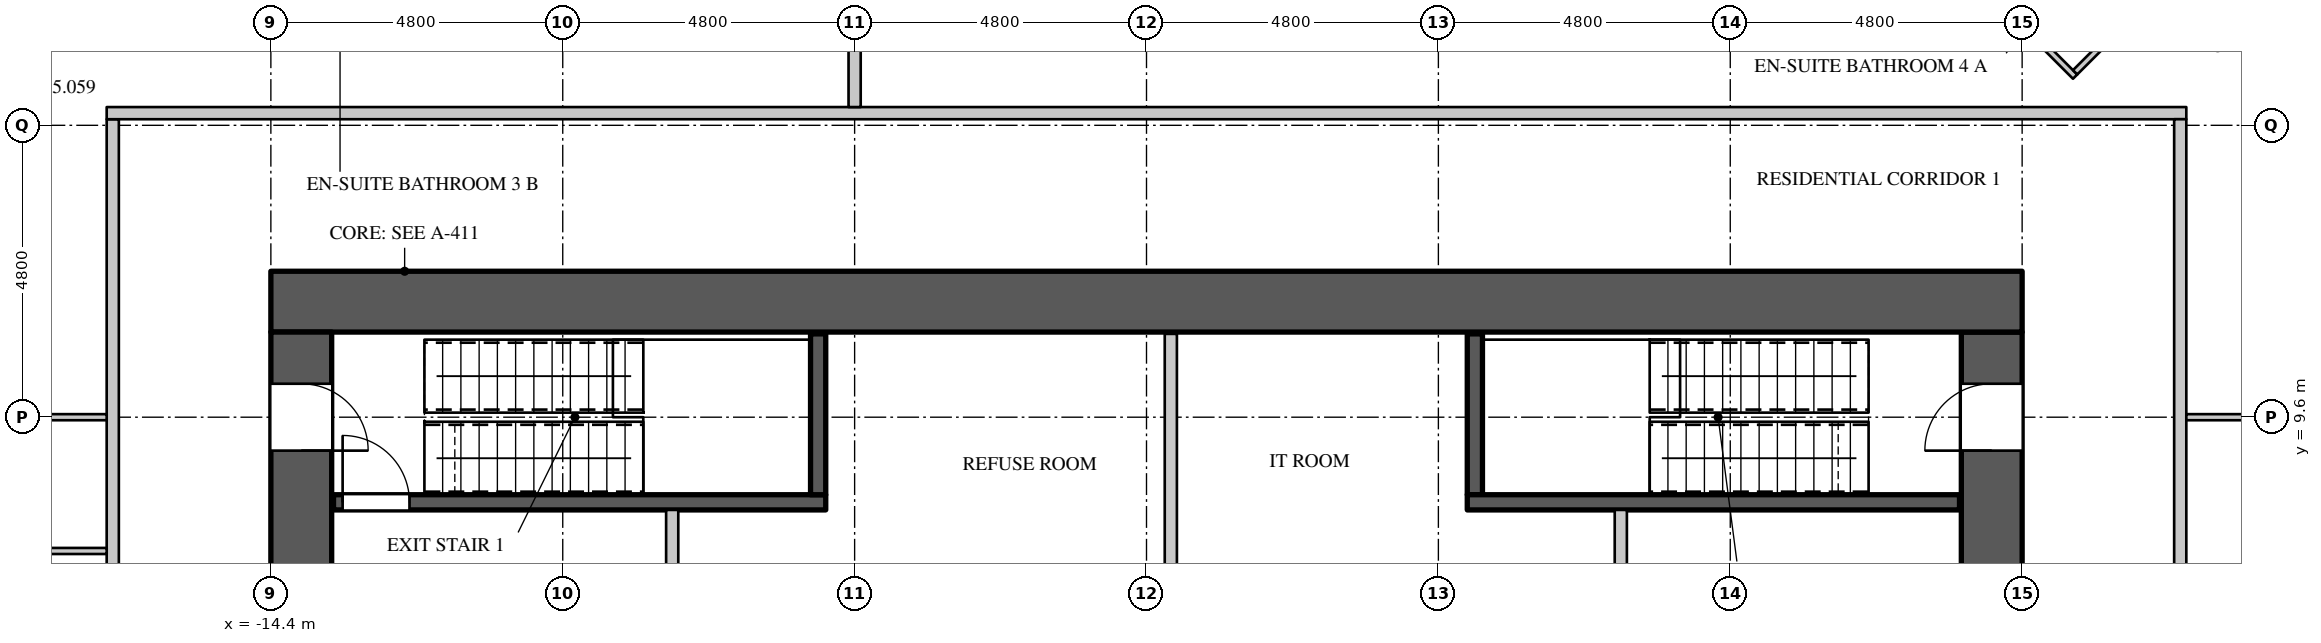
"""IFC4 building model, lengths in metres.
Left out: names, types, materials, properties, quantities, classifications, styles, units other than length and angle.
Written with IfcOpenShell. Run it as: python <this file> out.ifc"""

import sys

from ifc_helpers import new_model, si_unit, direction, frame, frame_2d, origin, place, context, subcontext, project, spatial, rectangle, extrude, element, fill, save


model = new_model("IFC4")
c1 = context("Model", 3, precision=1e-05, world=origin(), true_north=direction((0.0, 1.0)))
c2 = subcontext(c1, "Body", "Model", "MODEL_VIEW")
j1 = project(units=[si_unit("LENGTHUNIT", "METRE"), si_unit("PLANEANGLEUNIT", "RADIAN")], contexts=[c1])
p1 = place(None, origin())
s1 = spatial("IfcSite", under=j1, at=p1, CompositionType="ELEMENT")
p2 = place(p1, origin())
s2 = spatial("IfcBuilding", under=s1, at=p2, CompositionType="ELEMENT")
p3 = place(p2, frame((0.0, 0.0, 59.1)))
s3 = spatial("IfcBuildingStorey", under=s2, at=p3, CompositionType="ELEMENT", Elevation=59.1)
p4 = place(p3, frame((-14.4, 11.5, 0.0), z_axis=(0.0, 0.0, 1.0), x_axis=(1.0, 0.0, 0.0)))
e1 = element("IfcWall", 1, at=p4, inside=s3, PredefinedType="SHEAR", context=c2, shape_type="SweptSolid", body=[
    extrude(rectangle(XDim=28.8, YDim=1.0, at=frame_2d((14.4, 0.0))), origin(), (0.0, 0.0, 1.0), 4.2),
])
p5 = place(p3, frame((13.9, -11.0, 0.0), z_axis=(0.0, 0.0, 1.0), x_axis=(0.0, 1.0, 0.0)))
e2 = element("IfcWall", 2, at=p5, inside=s3, PredefinedType="SHEAR", context=c2, shape_type="SweptSolid", body=[
    extrude(rectangle(XDim=22.0, YDim=1.0, at=frame_2d((11.0, 0.0))), origin(), (0.0, 0.0, 1.0), 4.2),
])
p6 = place(p5, frame((20.05, 0.0, 0.0)))
e3 = element("IfcOpeningElement", 3, at=p6, cuts=e2, PredefinedType="OPENING", context=c2, shape_type="SweptSolid", body=[
    extrude(rectangle(XDim=1.1, YDim=2.2, at=frame_2d((0.55, 1.1))), frame((0.0, 0.51, 0.0), z_axis=(0.0, -1.0, 0.0), x_axis=(1.0, 0.0, 0.0)), (0.0, 0.0, 1.0), 1.02),
])
p7 = place(p5, frame((0.85, 0.0, 0.0)))
e4 = element("IfcOpeningElement", 4, at=p7, cuts=e2, PredefinedType="OPENING", context=c2, shape_type="SweptSolid", body=[
    extrude(rectangle(XDim=1.1, YDim=2.2, at=frame_2d((0.55, 1.1))), frame((0.0, 0.51, 0.0), z_axis=(0.0, -1.0, 0.0), x_axis=(1.0, 0.0, 0.0)), (0.0, 0.0, 1.0), 1.02),
])
p8 = place(p5, frame((14.55, 0.0, 0.0)))
e5 = element("IfcOpeningElement", 5, at=p8, cuts=e2, PredefinedType="OPENING", context=c2, shape_type="SweptSolid", body=[
    extrude(rectangle(XDim=1.5, YDim=2.4, at=frame_2d((0.75, 1.2))), frame((0.0, 0.51, 0.0), z_axis=(0.0, -1.0, 0.0), x_axis=(1.0, 0.0, 0.0)), (0.0, 0.0, 1.0), 1.02),
])
p9 = place(p5, frame((5.95, 0.0, 0.0)))
e6 = element("IfcOpeningElement", 6, at=p9, cuts=e2, PredefinedType="OPENING", context=c2, shape_type="SweptSolid", body=[
    extrude(rectangle(XDim=1.5, YDim=2.4, at=frame_2d((0.75, 1.2))), frame((0.0, 0.51, 0.0), z_axis=(0.0, -1.0, 0.0), x_axis=(1.0, 0.0, 0.0)), (0.0, 0.0, 1.0), 1.02),
])
p10 = place(p3, frame((-13.9, -11.0, 0.0), z_axis=(0.0, 0.0, 1.0), x_axis=(0.0, 1.0, 0.0)))
e7 = element("IfcWall", 7, at=p10, inside=s3, PredefinedType="SHEAR", context=c2, shape_type="SweptSolid", body=[
    extrude(rectangle(XDim=22.0, YDim=1.0, at=frame_2d((11.0, 0.0))), origin(), (0.0, 0.0, 1.0), 4.2),
])
p11 = place(p10, frame((20.05, 0.0, 0.0)))
e8 = element("IfcOpeningElement", 8, at=p11, cuts=e7, PredefinedType="OPENING", context=c2, shape_type="SweptSolid", body=[
    extrude(rectangle(XDim=1.1, YDim=2.2, at=frame_2d((0.55, 1.1))), frame((0.0, 0.51, 0.0), z_axis=(0.0, -1.0, 0.0), x_axis=(1.0, 0.0, 0.0)), (0.0, 0.0, 1.0), 1.02),
])
p12 = place(p10, frame((0.85, 0.0, 0.0)))
e9 = element("IfcOpeningElement", 9, at=p12, cuts=e7, PredefinedType="OPENING", context=c2, shape_type="SweptSolid", body=[
    extrude(rectangle(XDim=1.1, YDim=2.2, at=frame_2d((0.55, 1.1))), frame((0.0, 0.51, 0.0), z_axis=(0.0, -1.0, 0.0), x_axis=(1.0, 0.0, 0.0)), (0.0, 0.0, 1.0), 1.02),
])
p13 = place(p10, frame((15.75, 0.0, 0.0)))
e10 = element("IfcOpeningElement", 10, at=p13, cuts=e7, PredefinedType="OPENING", context=c2, shape_type="SweptSolid", body=[
    extrude(rectangle(XDim=1.5, YDim=2.4, at=frame_2d((0.75, 1.2))), frame((0.0, 0.51, 0.0), z_axis=(0.0, -1.0, 0.0), x_axis=(1.0, 0.0, 0.0)), (0.0, 0.0, 1.0), 1.02),
])
p14 = place(p10, frame((4.75, 0.0, 0.0)))
e11 = element("IfcOpeningElement", 11, at=p14, cuts=e7, PredefinedType="OPENING", context=c2, shape_type="SweptSolid", body=[
    extrude(rectangle(XDim=1.5, YDim=2.4, at=frame_2d((0.75, 1.2))), frame((0.0, 0.51, 0.0), z_axis=(0.0, -1.0, 0.0), x_axis=(1.0, 0.0, 0.0)), (0.0, 0.0, 1.0), 1.02),
])
p15 = place(p3, frame((-17.0, -14.5, 0.0), z_axis=(0.0, 0.0, 1.0), x_axis=(0.0, 1.0, 0.0)))
e12 = element("IfcWall", 12, at=p15, inside=s3, PredefinedType="PARTITIONING", context=c2, shape_type="SweptSolid", body=[
    extrude(rectangle(XDim=29.0, YDim=0.2, at=frame_2d((14.5, 0.0))), origin(), (0.0, 0.0, 1.0), 3.95),
])
p16 = place(p15, frame((16.55, 0.0, 0.0)))
e13 = element("IfcOpeningElement", 13, at=p16, cuts=e12, PredefinedType="OPENING", context=c2, shape_type="SweptSolid", body=[
    extrude(rectangle(XDim=1.1, YDim=2.4, at=frame_2d((0.55, 1.2))), frame((0.0, 0.11, 0.0), z_axis=(0.0, -1.0, 0.0), x_axis=(1.0, 0.0, 0.0)), (0.0, 0.0, 1.0), 0.22),
])
p17 = place(p3, frame((-17.1, 14.6, 0.0), z_axis=(0.0, 0.0, 1.0), x_axis=(1.0, 0.0, 0.0)))
e14 = element("IfcWall", 14, at=p17, inside=s3, PredefinedType="PARTITIONING", context=c2, shape_type="SweptSolid", body=[
    extrude(rectangle(XDim=34.2, YDim=0.2, at=frame_2d((17.1, 0.0))), origin(), (0.0, 0.0, 1.0), 3.95),
])
p18 = place(p3, frame((-7.8, 2.8, 0.0), z_axis=(0.0, 0.0, 1.0), x_axis=(0.0, 1.0, 0.0)))
e15 = element("IfcWall", 15, at=p18, inside=s3, PredefinedType="PARTITIONING", context=c2, shape_type="SweptSolid", body=[
    extrude(rectangle(XDim=5.275, YDim=0.2, at=frame_2d((2.637, 0.0))), origin(), (0.0, 0.0, 1.0), 3.95),
])
p19 = place(p18, frame((0.75, 0.0, 0.0)))
e16 = element("IfcOpeningElement", 16, at=p19, cuts=e15, PredefinedType="OPENING", context=c2, shape_type="SweptSolid", body=[
    extrude(rectangle(XDim=1.5, YDim=2.4, at=frame_2d((0.75, 1.2))), frame((0.0, 0.11, 0.0), z_axis=(0.0, -1.0, 0.0), x_axis=(1.0, 0.0, 0.0)), (0.0, 0.0, 1.0), 0.22),
])
p20 = place(p3, frame((17.0, -14.5, 0.0), z_axis=(0.0, 0.0, 1.0), x_axis=(0.0, 1.0, 0.0)))
e17 = element("IfcWall", 17, at=p20, inside=s3, PredefinedType="PARTITIONING", context=c2, shape_type="SweptSolid", body=[
    extrude(rectangle(XDim=29.0, YDim=0.2, at=frame_2d((14.5, 0.0))), origin(), (0.0, 0.0, 1.0), 3.95),
])
p21 = place(p20, frame((15.9, 0.0, 0.0)))
e18 = element("IfcOpeningElement", 18, at=p21, cuts=e17, PredefinedType="OPENING", context=c2, shape_type="SweptSolid", body=[
    extrude(rectangle(XDim=1.1, YDim=2.4, at=frame_2d((0.55, 1.2))), frame((0.0, 0.11, 0.0), z_axis=(0.0, -1.0, 0.0), x_axis=(1.0, 0.0, 0.0)), (0.0, 0.0, 1.0), 0.22),
])
p22 = place(p3, frame((-22.547, 11.885, 0.0), z_axis=(0.0, 0.0, 1.0), x_axis=(0.707106781187, 0.707106781187, 0.0)))
e19 = element("IfcWall", 19, at=p22, inside=s3, PredefinedType="PARTITIONING", context=c2, shape_type="SweptSolid", body=[
    extrude(rectangle(XDim=9.83, YDim=0.15, at=frame_2d((4.915, 0.0))), origin(), (0.0, 0.0, 1.0), 3.95),
])
p23 = place(p22, frame((3.95, 0.0, 0.0)))
e20 = element("IfcOpeningElement", 20, at=p23, cuts=e19, PredefinedType="OPENING", context=c2, shape_type="SweptSolid", body=[
    extrude(rectangle(XDim=0.95, YDim=2.2, at=frame_2d((0.475, 1.1))), frame((0.0, 0.085, 0.0), z_axis=(0.0, -1.0, 0.0), x_axis=(1.0, 0.0, 0.0)), (0.0, 0.0, 1.0), 0.17),
])
p24 = place(p22, frame((8.25, 0.0, 0.0)))
e21 = element("IfcOpeningElement", 21, at=p24, cuts=e19, PredefinedType="OPENING", context=c2, shape_type="SweptSolid", body=[
    extrude(rectangle(XDim=0.95, YDim=2.2, at=frame_2d((0.475, 1.1))), frame((0.0, 0.085, 0.0), z_axis=(0.0, -1.0, 0.0), x_axis=(1.0, 0.0, 0.0)), (0.0, 0.0, 1.0), 0.17),
])
p25 = place(p3, frame((17.499, 17.499, 0.0), z_axis=(0.0, 0.0, 1.0), x_axis=(0.707106781187, -0.707106781187, 0.0)))
e22 = element("IfcWall", 22, at=p25, inside=s3, PredefinedType="PARTITIONING", context=c2, shape_type="SweptSolid", body=[
    extrude(rectangle(XDim=7.855, YDim=0.15, at=frame_2d((3.927, 0.0))), origin(), (0.0, 0.0, 1.0), 3.95),
])
p26 = place(p25, frame((6.7, 0.0, 0.0)))
e23 = element("IfcOpeningElement", 23, at=p26, cuts=e22, PredefinedType="OPENING", context=c2, shape_type="SweptSolid", body=[
    extrude(rectangle(XDim=0.95, YDim=2.2, at=frame_2d((0.475, 1.1))), frame((0.0, 0.085, 0.0), z_axis=(0.0, -1.0, 0.0), x_axis=(1.0, 0.0, 0.0)), (0.0, 0.0, 1.0), 0.17),
])
p27 = place(p25, frame((2.1, 0.0, 0.0)))
e24 = element("IfcOpeningElement", 24, at=p27, cuts=e22, PredefinedType="OPENING", context=c2, shape_type="SweptSolid", body=[
    extrude(rectangle(XDim=0.95, YDim=2.2, at=frame_2d((0.475, 1.1))), frame((0.0, 0.085, 0.0), z_axis=(0.0, -1.0, 0.0), x_axis=(1.0, 0.0, 0.0)), (0.0, 0.0, 1.0), 0.17),
])
p28 = place(p3, frame((-4.8, 14.7, 0.0), z_axis=(0.0, 0.0, 1.0), x_axis=(0.0, 1.0, 0.0)))
e25 = element("IfcWall", 25, at=p28, inside=s3, PredefinedType="PARTITIONING", context=c2, shape_type="SweptSolid", body=[
    extrude(rectangle(XDim=13.2, YDim=0.2, at=frame_2d((6.6, 0.0))), origin(), (0.0, 0.0, 1.0), 3.2),
])
p29 = place(p3, frame((0.4, 5.9, 0.0), z_axis=(0.0, 0.0, 1.0), x_axis=(0.0, 1.0, 0.0)))
e26 = element("IfcWall", 26, at=p29, inside=s3, PredefinedType="PARTITIONING", context=c2, shape_type="SweptSolid", body=[
    extrude(rectangle(XDim=5.07, YDim=0.2, at=frame_2d((2.535, 0.0))), origin(), (0.0, 0.0, 1.0), 3.95),
])
p30 = place(p3, frame((7.8, 5.9, 0.0), z_axis=(0.0, 0.0, 1.0), x_axis=(0.0, 1.0, 0.0)))
e27 = element("IfcWall", 27, at=p30, inside=s3, PredefinedType="PARTITIONING", context=c2, shape_type="SweptSolid", body=[
    extrude(rectangle(XDim=2.175, YDim=0.2, at=frame_2d((1.087, 0.0))), origin(), (0.0, 0.0, 1.0), 3.95),
])
p31 = place(p3, frame((-13.37, 8.2, 0.0), z_axis=(0.0, 0.0, 1.0), x_axis=(1.0, 0.0, 0.0)))
e28 = element("IfcWall", 28, at=p31, inside=s3, PredefinedType="SHEAR", context=c2, shape_type="SweptSolid", body=[
    extrude(rectangle(XDim=8.095, YDim=0.25, at=frame_2d((4.048, 0.0))), origin(), (0.0, 0.0, 1.0), 3.95),
])
p32 = place(p31, frame((0.15, 0.0, 0.0)))
e29 = element("IfcOpeningElement", 29, at=p32, cuts=e28, PredefinedType="OPENING", context=c2, shape_type="SweptSolid", body=[
    extrude(rectangle(XDim=1.1, YDim=2.2, at=frame_2d((0.55, 1.1))), frame((0.0, 0.135, 0.0), z_axis=(0.0, -1.0, 0.0), x_axis=(1.0, 0.0, 0.0)), (0.0, 0.0, 1.0), 0.27),
])
for number, where, z_axis, x_axis in (
    (30, (-5.4, 8.325, 0.0), (0.0, 0.0, 1.0), (0.0, 1.0, 0.0)),
    (31, (5.4, 8.325, 0.0), (0.0, 0.0, 1.0), (0.0, 1.0, 0.0)),
):
    element("IfcWall", number, at=place(p3, frame(where, z_axis=z_axis, x_axis=x_axis)), inside=s3, PredefinedType="SHEAR", context=c2, shape_type="SweptSolid", body=[
        extrude(rectangle(XDim=2.645, YDim=0.25, at=frame_2d((1.323, 0.0))), origin(), (0.0, 0.0, 1.0), 3.95),
    ])
p33 = place(p3, frame((5.275, 8.2, 0.0), z_axis=(0.0, 0.0, 1.0), x_axis=(1.0, 0.0, 0.0)))
e32 = element("IfcWall", 32, at=p33, inside=s3, PredefinedType="SHEAR", context=c2, shape_type="SweptSolid", body=[
    extrude(rectangle(XDim=8.095, YDim=0.25, at=frame_2d((4.048, 0.0))), origin(), (0.0, 0.0, 1.0), 3.95),
])
p34 = place(p3, frame((-21.78, 9.6, 0.0), z_axis=(0.0, 0.0, 1.0), x_axis=(1.0, 0.0, 0.0)))
e33 = element("IfcWall", 33, at=p34, inside=s3, PredefinedType="PARTITIONING", context=c2, shape_type="SweptSolid", body=[
    extrude(rectangle(XDim=4.68, YDim=0.1, at=frame_2d((2.34, 0.0))), origin(), (0.0, 0.0, 1.0), 3.95),
])
p35 = place(p34, frame((1.95, 0.0, 0.0)))
e34 = element("IfcOpeningElement", 34, at=p35, cuts=e33, PredefinedType="OPENING", context=c2, shape_type="SweptSolid", body=[
    extrude(rectangle(XDim=0.9, YDim=2.2, at=frame_2d((0.45, 1.1))), frame((0.0, 0.06, 0.0), z_axis=(0.0, -1.0, 0.0), x_axis=(1.0, 0.0, 0.0)), (0.0, 0.0, 1.0), 0.12),
])
p36 = place(p3, frame((-21.725, 7.4, 0.0), z_axis=(0.0, 0.0, 1.0), x_axis=(1.0, 0.0, 0.0)))
e35 = element("IfcWall", 35, at=p36, inside=s3, PredefinedType="PARTITIONING", context=c2, shape_type="SweptSolid", body=[
    extrude(rectangle(XDim=4.625, YDim=0.1, at=frame_2d((2.312, 0.0))), origin(), (0.0, 0.0, 1.0), 3.95),
])
p37 = place(p3, frame((13.221, 17.251, 0.0), z_axis=(0.0, 0.0, 1.0), x_axis=(0.707148872128, -0.707064687739, 0.0)))
e36 = element("IfcWall", 36, at=p37, inside=s3, PredefinedType="PARTITIONING", context=c2, shape_type="SweptSolid", body=[
    extrude(rectangle(XDim=2.9, YDim=0.1, at=frame_2d((1.45, 0.0))), origin(), (0.0, 0.0, 1.0), 3.95),
])
p38 = place(p3, frame((15.271, 15.271, 0.0), z_axis=(0.0, 0.0, 1.0), x_axis=(0.707106781187, 0.707106781187, 0.0)))
e37 = element("IfcWall", 37, at=p38, inside=s3, PredefinedType="PARTITIONING", context=c2, shape_type="SweptSolid", body=[
    extrude(rectangle(XDim=3.13, YDim=0.1, at=frame_2d((1.565, 0.0))), origin(), (0.0, 0.0, 1.0), 3.95),
])
p39 = place(p3, frame((17.1, 9.6, 0.0), z_axis=(0.0, 0.0, 1.0), x_axis=(1.0, 0.0, 0.0)))
e38 = element("IfcWall", 38, at=p39, inside=s3, PredefinedType="PARTITIONING", context=c2, shape_type="SweptSolid", body=[
    extrude(rectangle(XDim=4.7, YDim=0.1, at=frame_2d((2.35, 0.0))), origin(), (0.0, 0.0, 1.0), 3.95),
])
p40 = place(p39, frame((1.85, 0.0, 0.0)))
e39 = element("IfcOpeningElement", 39, at=p40, cuts=e38, PredefinedType="OPENING", context=c2, shape_type="SweptSolid", body=[
    extrude(rectangle(XDim=0.9, YDim=2.2, at=frame_2d((0.45, 1.1))), frame((0.0, 0.06, 0.0), z_axis=(0.0, -1.0, 0.0), x_axis=(1.0, 0.0, 0.0)), (0.0, 0.0, 1.0), 0.12),
])
p41 = place(p32, origin())
e40 = element("IfcDoor", 40, at=p41, inside=s3, OperationType="SINGLE_SWING_LEFT", PredefinedType="DOOR", context=c2, shape_type="SweptSolid", body=[
    extrude(rectangle(XDim=1.1, YDim=2.2, at=frame_2d((0.55, 1.1))), frame((0.0, 0.025, 0.0), z_axis=(0.0, -1.0, 0.0), x_axis=(1.0, 0.0, 0.0)), (0.0, 0.0, 1.0), 0.05),
])
fill(e29, e40)
p42 = place(p11, origin())
e41 = element("IfcDoor", 41, at=p42, inside=s3, OperationType="SINGLE_SWING_RIGHT", PredefinedType="DOOR", context=c2, shape_type="SweptSolid", body=[
    extrude(rectangle(XDim=1.1, YDim=2.2, at=frame_2d((0.55, 1.1))), frame((0.0, -0.445, 0.0), z_axis=(0.0, -1.0, 0.0), x_axis=(1.0, 0.0, 0.0)), (0.0, 0.0, 1.0), 0.05),
])
fill(e8, e41)
p43 = place(p6, origin())
e42 = element("IfcDoor", 42, at=p43, inside=s3, OperationType="SINGLE_SWING_LEFT", PredefinedType="DOOR", context=c2, shape_type="SweptSolid", body=[
    extrude(rectangle(XDim=1.1, YDim=2.2, at=frame_2d((0.55, 1.1))), frame((0.0, 0.495, 0.0), z_axis=(0.0, -1.0, 0.0), x_axis=(1.0, 0.0, 0.0)), (0.0, 0.0, 1.0), 0.05),
])
fill(e3, e42)
save(model, sys.argv[1])
